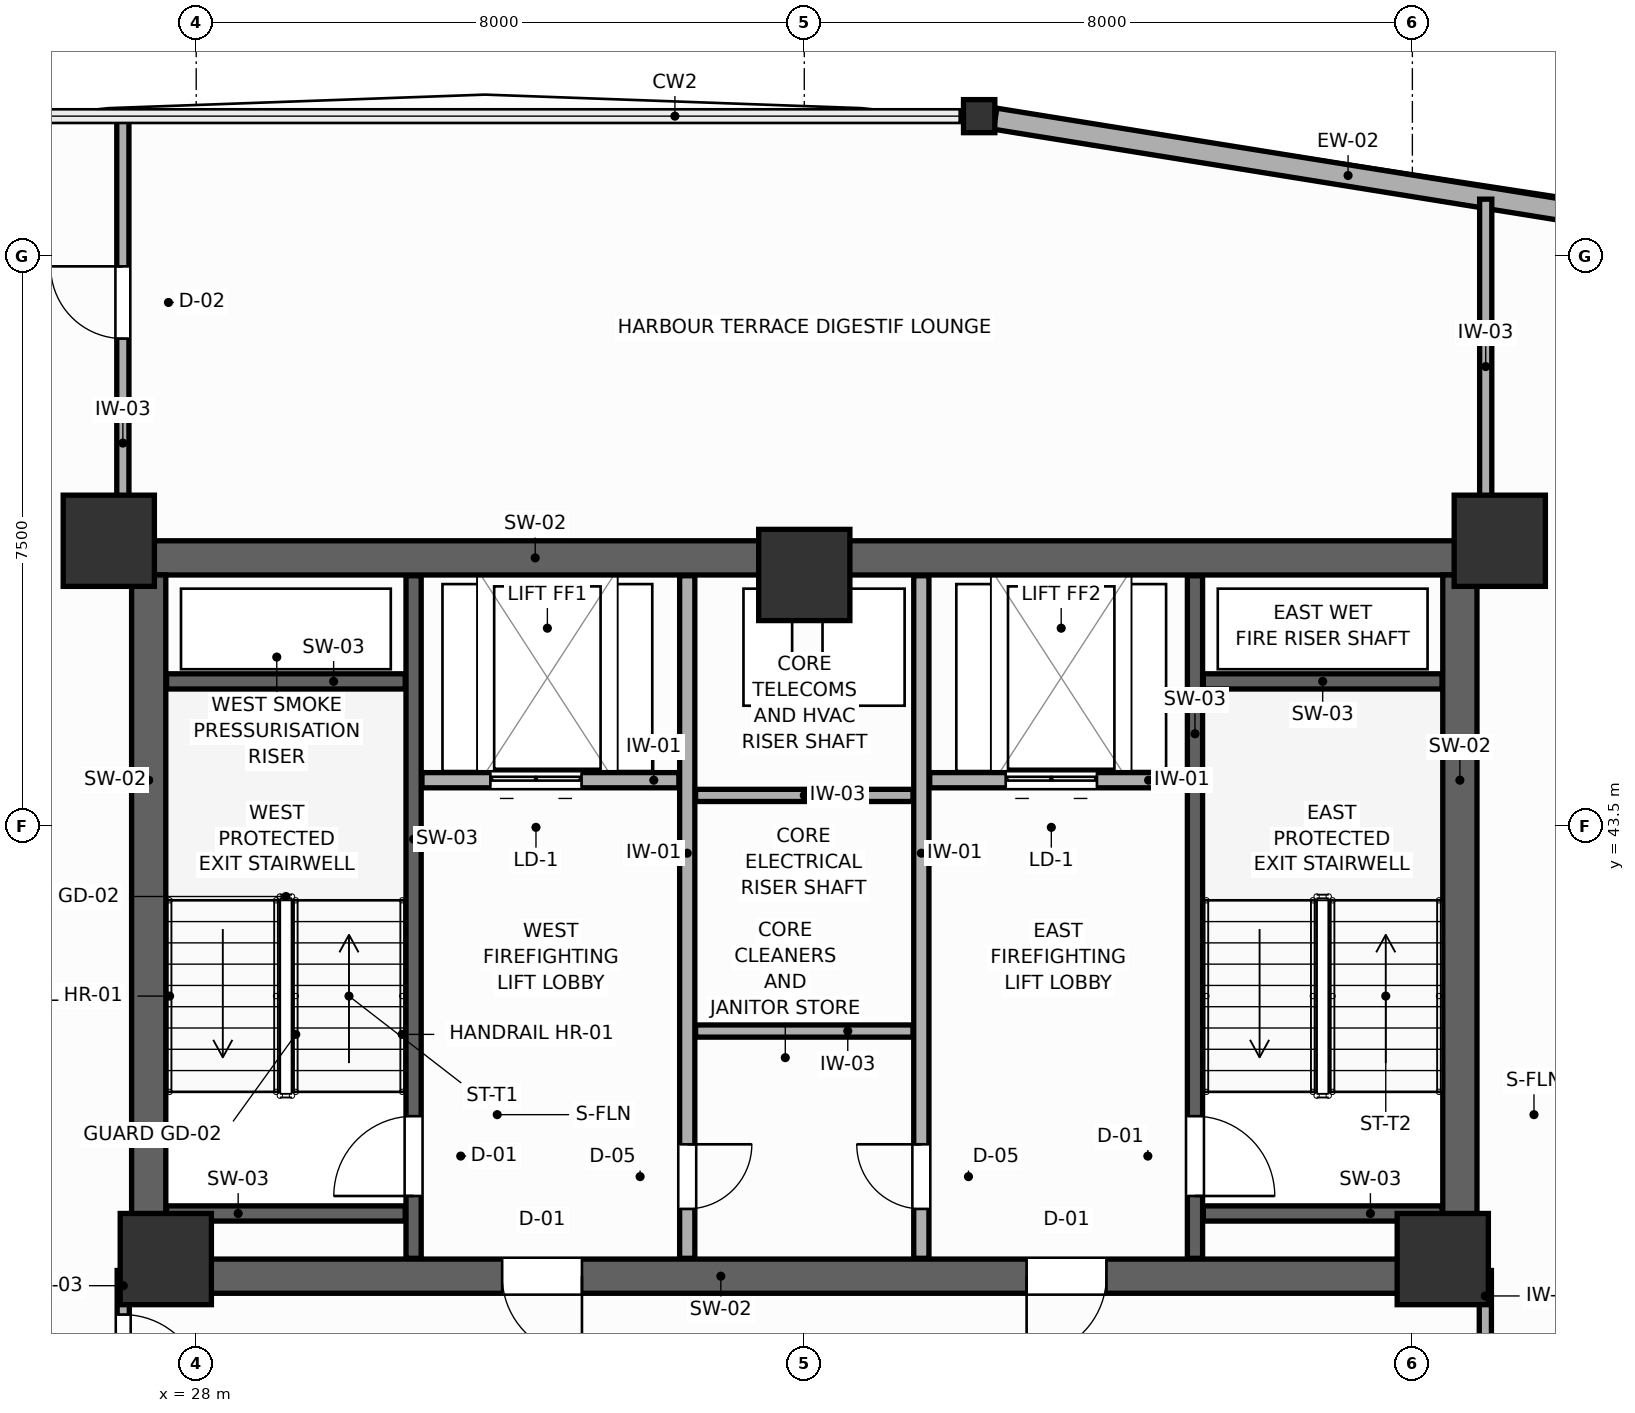
"""IFC4 building model, lengths in metres.
Left out: names, types, materials, properties, quantities, classifications, styles, units other than length and angle.
Written with IfcOpenShell. Run it as: python <this file> out.ifc"""

import sys

from ifc_helpers import new_model, si_unit, direction, frame, frame_2d, origin, origin_2d, place, context, subcontext, project, spatial, rectangle, i_section, extrude, source, transform, mapped, element, fill, save


model = new_model("IFC4")
c1 = context("Model", 3, precision=1e-05, world=origin(), true_north=direction((0.0, 1.0)))
c2 = subcontext(c1, "Body", "Model", "MODEL_VIEW")
j1 = project(units=[si_unit("LENGTHUNIT", "METRE"), si_unit("PLANEANGLEUNIT", "RADIAN")], contexts=[c1])
p1 = place(None, origin())
s1 = spatial("IfcSite", under=j1, at=p1, CompositionType="ELEMENT")
p2 = place(p1, origin())
s2 = spatial("IfcBuilding", under=s1, at=p2, CompositionType="ELEMENT")
p3 = place(p2, frame((0.0, 0.0, 150.6)))
s3 = spatial("IfcBuildingStorey", under=s2, at=p3, CompositionType="ELEMENT", Elevation=150.6)
p4 = place(p3, frame((27.15, 47.025, 0.0), z_axis=(0.0, 0.0, 1.0), x_axis=(1.0, 0.0, 0.0)))
e1 = element("IfcWall", 1, at=p4, inside=s3, PredefinedType="SHEAR", context=c2, shape_type="SweptSolid", body=[
    extrude(rectangle(XDim=17.7, YDim=0.45, at=frame_2d((8.85, 0.0))), origin(), (0.0, 0.0, 1.0), 3.6),
])
p5 = place(p3, frame((27.15, 37.575, 0.0), z_axis=(0.0, 0.0, 1.0), x_axis=(1.0, 0.0, 0.0)))
e2 = element("IfcWall", 2, at=p5, inside=s3, PredefinedType="SHEAR", context=c2, shape_type="SweptSolid", body=[
    extrude(rectangle(XDim=17.7, YDim=0.45, at=frame_2d((8.85, 0.0))), origin(), (0.0, 0.0, 1.0), 3.6),
])
p6 = place(p5, frame((4.875, 0.0, 0.0)))
e3 = element("IfcOpeningElement", 3, at=p6, cuts=e2, PredefinedType="OPENING", context=c2, shape_type="SweptSolid", body=[
    extrude(rectangle(XDim=1.05, YDim=2.1, at=frame_2d((0.525, 1.05))), frame((0.0, 0.235, 0.0), z_axis=(0.0, -1.0, 0.0), x_axis=(1.0, 0.0, 0.0)), (0.0, 0.0, 1.0), 0.47),
])
p7 = place(p5, frame((11.775, 0.0, 0.0)))
e4 = element("IfcOpeningElement", 4, at=p7, cuts=e2, PredefinedType="OPENING", context=c2, shape_type="SweptSolid", body=[
    extrude(rectangle(XDim=1.05, YDim=2.1, at=frame_2d((0.525, 1.05))), frame((0.0, 0.235, 0.0), z_axis=(0.0, -1.0, 0.0), x_axis=(1.0, 0.0, 0.0)), (0.0, 0.0, 1.0), 0.47),
])
for number, where, z_axis, x_axis in (
    (5, (27.375, 37.8, 0.0), (0.0, 0.0, 1.0), (0.0, 1.0, 0.0)),
    (6, (44.625, 37.8, 0.0), (0.0, 0.0, 1.0), (0.0, 1.0, 0.0)),
):
    element("IfcWall", number, at=place(p3, frame(where, z_axis=z_axis, x_axis=x_axis)), inside=s3, PredefinedType="SHEAR", context=c2, shape_type="SweptSolid", body=[
        extrude(rectangle(XDim=9.0, YDim=0.45, at=frame_2d((4.5, 0.0))), origin(), (0.0, 0.0, 1.0), 3.6),
    ])
m1 = source(origin(), c2, "Body", "SweptSolid", [
    extrude(rectangle(XDim=1.2, YDim=1.2, at=origin_2d()), origin(), (0.0, 0.0, 1.0), 3.6),
])
for number, where, z_axis, x_axis in (
    (7, (26.85, 47.25, 0.0), (0.0, 0.0, 1.0), (1.0, 0.0, 0.0)),
    (8, (45.15, 47.25, 0.0), (0.0, 0.0, 1.0), (1.0, 0.0, 0.0)),
    (9, (27.6, 37.8, 0.0), (0.0, 0.0, 1.0), (1.0, 0.0, 0.0)),
    (10, (44.4, 37.8, 0.0), (0.0, 0.0, 1.0), (1.0, 0.0, 0.0)),
    (11, (36.0, 46.8, 0.0), (0.0, 0.0, 1.0), (1.0, 0.0, 0.0)),
):
    element("IfcColumn", number, at=place(p3, frame(where, z_axis=z_axis, x_axis=x_axis)), inside=s3, PredefinedType="COLUMN", context=c2, shape_type="MappedRepresentation", body=[
        mapped(m1, transform((0.0, 0.0, 0.0), scale=1.0)),
    ])
m2 = source(origin(), c2, "Body", "SweptSolid", [
    extrude(i_section(OverallWidth=0.412, OverallDepth=0.435, WebThickness=0.033, FlangeThickness=0.053, FilletRadius=0.015, at=origin_2d()), origin(), (0.0, 0.0, 1.0), 3.6),
])
p8 = place(p3, frame((38.301, 52.836, 0.0), z_axis=(0.0, 0.0, 1.0), x_axis=(1.0, 0.0, 0.0)))
e12 = element("IfcColumn", 12, at=p8, inside=s3, PredefinedType="COLUMN", context=c2, shape_type="MappedRepresentation", body=[
    mapped(m2, transform((0.0, 0.0, 0.0), scale=1.0)),
])
p9 = place(p3, frame((53.07, 50.46, 0.0), z_axis=(0.0, 0.0, 1.0), x_axis=(-0.987303259595, 0.158846698404, 0.0)))
e13 = element("IfcWall", 13, at=p9, inside=s3, PredefinedType="SOLIDWALL", context=c2, shape_type="SweptSolid", body=[
    extrude(rectangle(XDim=14.746, YDim=0.28, at=frame_2d((7.373, 0.0))), origin(), (0.0, 0.0, 1.0), 3.0),
])
p10 = place(p9, frame((3.461, 0.0, 0.75)))
e14 = element("IfcOpeningElement", 14, at=p10, cuts=e13, PredefinedType="OPENING", context=c2, shape_type="SweptSolid", body=[
    extrude(rectangle(XDim=1.7, YDim=1.75, at=frame_2d((0.85, 0.875))), frame((0.0, 0.15, 0.0), z_axis=(0.0, -1.0, 0.0), x_axis=(1.0, 0.0, 0.0)), (0.0, 0.0, 1.0), 0.3),
])
p11 = place(p3, frame((30.86, 37.81, 0.0), z_axis=(0.0, 0.0, 1.0), x_axis=(0.0, 1.0, 0.0)))
e15 = element("IfcWall", 15, at=p11, inside=s3, PredefinedType="SHEAR", context=c2, shape_type="SweptSolid", body=[
    extrude(rectangle(XDim=8.98, YDim=0.2, at=frame_2d((4.49, 0.0))), origin(), (0.0, 0.0, 1.0), 3.6),
])
p12 = place(p11, frame((0.82, 0.0, 0.0)))
e16 = element("IfcOpeningElement", 16, at=p12, cuts=e15, PredefinedType="OPENING", context=c2, shape_type="SweptSolid", body=[
    extrude(rectangle(XDim=1.05, YDim=2.1, at=frame_2d((0.525, 1.05))), frame((0.0, 0.11, 0.0), z_axis=(0.0, -1.0, 0.0), x_axis=(1.0, 0.0, 0.0)), (0.0, 0.0, 1.0), 0.22),
])
for number, where, z_axis, x_axis in (
    (17, (27.61, 45.4, 0.0), (0.0, 0.0, 1.0), (1.0, 0.0, 0.0)),
    (18, (27.61, 38.4, 0.0), (0.0, 0.0, 1.0), (1.0, 0.0, 0.0)),
):
    element("IfcWall", number, at=place(p3, frame(where, z_axis=z_axis, x_axis=x_axis)), inside=s3, PredefinedType="SHEAR", context=c2, shape_type="SweptSolid", body=[
        extrude(rectangle(XDim=3.14, YDim=0.2, at=frame_2d((1.57, 0.0))), origin(), (0.0, 0.0, 1.0), 3.6),
    ])
p13 = place(p3, frame((41.14, 37.81, 0.0), z_axis=(0.0, 0.0, 1.0), x_axis=(0.0, 1.0, 0.0)))
e19 = element("IfcWall", 19, at=p13, inside=s3, PredefinedType="SHEAR", context=c2, shape_type="SweptSolid", body=[
    extrude(rectangle(XDim=8.98, YDim=0.2, at=frame_2d((4.49, 0.0))), origin(), (0.0, 0.0, 1.0), 3.6),
])
p14 = place(p13, frame((0.82, 0.0, 0.0)))
e20 = element("IfcOpeningElement", 20, at=p14, cuts=e19, PredefinedType="OPENING", context=c2, shape_type="SweptSolid", body=[
    extrude(rectangle(XDim=1.05, YDim=2.1, at=frame_2d((0.525, 1.05))), frame((0.0, 0.11, 0.0), z_axis=(0.0, -1.0, 0.0), x_axis=(1.0, 0.0, 0.0)), (0.0, 0.0, 1.0), 0.22),
])
for number, where, z_axis, x_axis in (
    (21, (41.25, 45.4, 0.0), (0.0, 0.0, 1.0), (1.0, 0.0, 0.0)),
    (22, (41.25, 38.4, 0.0), (0.0, 0.0, 1.0), (1.0, 0.0, 0.0)),
):
    element("IfcWall", number, at=place(p3, frame(where, z_axis=z_axis, x_axis=x_axis)), inside=s3, PredefinedType="SHEAR", context=c2, shape_type="SweptSolid", body=[
        extrude(rectangle(XDim=3.14, YDim=0.2, at=frame_2d((1.57, 0.0))), origin(), (0.0, 0.0, 1.0), 3.6),
    ])
p15 = place(p3, frame((30.97, 44.1, 0.0), z_axis=(0.0, 0.0, 1.0), x_axis=(1.0, 0.0, 0.0)))
e23 = element("IfcWall", 23, at=p15, inside=s3, PredefinedType="PARTITIONING", context=c2, shape_type="SweptSolid", body=[
    extrude(rectangle(XDim=3.38, YDim=0.2, at=frame_2d((1.69, 0.0))), origin(), (0.0, 0.0, 1.0), 3.4),
])
p16 = place(p15, frame((0.9, 0.0, 0.0)))
e24 = element("IfcOpeningElement", 24, at=p16, cuts=e23, PredefinedType="OPENING", context=c2, shape_type="SweptSolid", body=[
    extrude(rectangle(XDim=1.2, YDim=2.1, at=frame_2d((0.6, 1.05))), frame((0.0, 0.11, 0.0), z_axis=(0.0, -1.0, 0.0), x_axis=(1.0, 0.0, 0.0)), (0.0, 0.0, 1.0), 0.22),
])
p17 = place(p3, frame((37.65, 44.1, 0.0), z_axis=(0.0, 0.0, 1.0), x_axis=(1.0, 0.0, 0.0)))
e25 = element("IfcWall", 25, at=p17, inside=s3, PredefinedType="PARTITIONING", context=c2, shape_type="SweptSolid", body=[
    extrude(rectangle(XDim=3.38, YDim=0.2, at=frame_2d((1.69, 0.0))), origin(), (0.0, 0.0, 1.0), 3.4),
])
p18 = place(p17, frame((1.0, 0.0, 0.0)))
e26 = element("IfcOpeningElement", 26, at=p18, cuts=e25, PredefinedType="OPENING", context=c2, shape_type="SweptSolid", body=[
    extrude(rectangle(XDim=1.2, YDim=2.1, at=frame_2d((0.6, 1.05))), frame((0.0, 0.11, 0.0), z_axis=(0.0, -1.0, 0.0), x_axis=(1.0, 0.0, 0.0)), (0.0, 0.0, 1.0), 0.22),
])
p19 = place(p3, frame((34.46, 37.81, 0.0), z_axis=(0.0, 0.0, 1.0), x_axis=(0.0, 1.0, 0.0)))
e27 = element("IfcWall", 27, at=p19, inside=s3, PredefinedType="PARTITIONING", context=c2, shape_type="SweptSolid", body=[
    extrude(rectangle(XDim=8.98, YDim=0.2, at=frame_2d((4.49, 0.0))), origin(), (0.0, 0.0, 1.0), 3.4),
])
p20 = place(p19, frame((0.65, 0.0, 0.0)))
e28 = element("IfcOpeningElement", 28, at=p20, cuts=e27, PredefinedType="OPENING", context=c2, shape_type="SweptSolid", body=[
    extrude(rectangle(XDim=0.85, YDim=2.05, at=frame_2d((0.425, 1.025))), frame((0.0, 0.11, 0.0), z_axis=(0.0, -1.0, 0.0), x_axis=(1.0, 0.0, 0.0)), (0.0, 0.0, 1.0), 0.22),
])
p21 = place(p3, frame((37.54, 37.81, 0.0), z_axis=(0.0, 0.0, 1.0), x_axis=(0.0, 1.0, 0.0)))
e29 = element("IfcWall", 29, at=p21, inside=s3, PredefinedType="PARTITIONING", context=c2, shape_type="SweptSolid", body=[
    extrude(rectangle(XDim=8.98, YDim=0.2, at=frame_2d((4.49, 0.0))), origin(), (0.0, 0.0, 1.0), 3.4),
])
p22 = place(p21, frame((0.65, 0.0, 0.0)))
e30 = element("IfcOpeningElement", 30, at=p22, cuts=e29, PredefinedType="OPENING", context=c2, shape_type="SweptSolid", body=[
    extrude(rectangle(XDim=0.85, YDim=2.05, at=frame_2d((0.425, 1.025))), frame((0.0, 0.11, 0.0), z_axis=(0.0, -1.0, 0.0), x_axis=(1.0, 0.0, 0.0)), (0.0, 0.0, 1.0), 0.22),
])
for number, where, z_axis, x_axis in (
    (31, (34.57, 40.8, 0.0), (0.0, 0.0, 1.0), (1.0, 0.0, 0.0)),
    (32, (34.57, 43.9, 0.0), (0.0, 0.0, 1.0), (1.0, 0.0, 0.0)),
):
    element("IfcWall", number, at=place(p3, frame(where, z_axis=z_axis, x_axis=x_axis)), inside=s3, PredefinedType="PARTITIONING", context=c2, shape_type="SweptSolid", body=[
        extrude(rectangle(XDim=2.86, YDim=0.16, at=frame_2d((1.43, 0.0))), origin(), (0.0, 0.0, 1.0), 3.4),
    ])
p23 = place(p3, frame((27.04, 35.54, 0.0), z_axis=(0.0, 0.0, 1.0), x_axis=(0.0, 1.0, 0.0)))
e33 = element("IfcWall", 33, at=p23, inside=s3, PredefinedType="PARTITIONING", context=c2, shape_type="SweptSolid", body=[
    extrude(rectangle(XDim=2.11, YDim=0.16, at=frame_2d((1.055, 0.0))), origin(), (0.0, 0.0, 1.0), 3.4),
])
p24 = place(p23, frame((0.48, 0.0, 0.0)))
e34 = element("IfcOpeningElement", 34, at=p24, cuts=e33, PredefinedType="OPENING", context=c2, shape_type="SweptSolid", body=[
    extrude(rectangle(XDim=1.05, YDim=2.1, at=frame_2d((0.525, 1.05))), frame((0.0, 0.09, 0.0), z_axis=(0.0, -1.0, 0.0), x_axis=(1.0, 0.0, 0.0)), (0.0, 0.0, 1.0), 0.18),
])
p25 = place(p3, frame((44.96, 35.0, 0.0), z_axis=(0.0, 0.0, 1.0), x_axis=(0.0, 1.0, 0.0)))
e35 = element("IfcWall", 35, at=p25, inside=s3, PredefinedType="PARTITIONING", context=c2, shape_type="SweptSolid", body=[
    extrude(rectangle(XDim=2.65, YDim=0.16, at=frame_2d((1.325, 0.0))), origin(), (0.0, 0.0, 1.0), 3.4),
])
p26 = place(p25, frame((0.75, 0.0, 0.0)))
e36 = element("IfcOpeningElement", 36, at=p26, cuts=e35, PredefinedType="OPENING", context=c2, shape_type="SweptSolid", body=[
    extrude(rectangle(XDim=1.05, YDim=2.1, at=frame_2d((0.525, 1.05))), frame((0.0, 0.09, 0.0), z_axis=(0.0, -1.0, 0.0), x_axis=(1.0, 0.0, 0.0)), (0.0, 0.0, 1.0), 0.18),
])
p27 = place(p3, frame((27.035, 47.34, 0.0), z_axis=(0.0, 0.0, 1.0), x_axis=(0.0, 1.0, 0.0)))
e37 = element("IfcWall", 37, at=p27, inside=s3, PredefinedType="PARTITIONING", context=c2, shape_type="SweptSolid", body=[
    extrude(rectangle(XDim=5.476, YDim=0.16, at=frame_2d((2.738, 0.0))), origin(), (0.0, 0.0, 1.0), 3.4),
])
p28 = place(p27, frame((2.57, 0.0, 0.0)))
e38 = element("IfcOpeningElement", 38, at=p28, cuts=e37, PredefinedType="OPENING", context=c2, shape_type="SweptSolid", body=[
    extrude(rectangle(XDim=0.95, YDim=2.05, at=frame_2d((0.475, 1.025))), frame((0.0, 0.09, 0.0), z_axis=(0.0, -1.0, 0.0), x_axis=(1.0, 0.0, 0.0)), (0.0, 0.0, 1.0), 0.18),
])
p29 = place(p3, frame((44.965, 47.34, 0.0), z_axis=(0.0, 0.0, 1.0), x_axis=(0.0, 1.0, 0.0)))
e39 = element("IfcWall", 39, at=p29, inside=s3, PredefinedType="PARTITIONING", context=c2, shape_type="SweptSolid", body=[
    extrude(rectangle(XDim=4.404, YDim=0.16, at=frame_2d((2.202, 0.0))), origin(), (0.0, 0.0, 1.0), 3.4),
])
p30 = place(p12, origin())
e40 = element("IfcDoor", 40, at=p30, inside=s3, OperationType="SINGLE_SWING_LEFT", PredefinedType="DOOR", context=c2, shape_type="SweptSolid", body=[
    extrude(rectangle(XDim=1.05, YDim=2.1, at=frame_2d((0.525, 1.05))), frame((0.0, 0.025, 0.0), z_axis=(0.0, -1.0, 0.0), x_axis=(1.0, 0.0, 0.0)), (0.0, 0.0, 1.0), 0.05),
])
fill(e16, e40)
p31 = place(p14, frame((1.05, 0.0, 0.0), z_axis=(0.0, 0.0, 1.0), x_axis=(-1.0, 0.0, 0.0)))
e41 = element("IfcDoor", 41, at=p31, inside=s3, OperationType="SINGLE_SWING_RIGHT", PredefinedType="DOOR", context=c2, shape_type="SweptSolid", body=[
    extrude(rectangle(XDim=1.05, YDim=2.1, at=frame_2d((0.525, 1.05))), frame((0.0, 0.025, 0.0), z_axis=(0.0, -1.0, 0.0), x_axis=(1.0, 0.0, 0.0)), (0.0, 0.0, 1.0), 0.05),
])
fill(e20, e41)
p32 = place(p16, origin())
e42 = element("IfcDoor", 42, at=p32, inside=s3, OperationType="DOUBLE_DOOR_SLIDING", PredefinedType="DOOR", context=c2, shape_type="SweptSolid", body=[
    extrude(rectangle(XDim=1.2, YDim=2.1, at=frame_2d((0.6, 1.05))), frame((0.0, 0.025, 0.0), z_axis=(0.0, -1.0, 0.0), x_axis=(1.0, 0.0, 0.0)), (0.0, 0.0, 1.0), 0.05),
])
fill(e24, e42)
p33 = place(p18, origin())
e43 = element("IfcDoor", 43, at=p33, inside=s3, OperationType="DOUBLE_DOOR_SLIDING", PredefinedType="DOOR", context=c2, shape_type="SweptSolid", body=[
    extrude(rectangle(XDim=1.2, YDim=2.1, at=frame_2d((0.6, 1.05))), frame((0.0, 0.025, 0.0), z_axis=(0.0, -1.0, 0.0), x_axis=(1.0, 0.0, 0.0)), (0.0, 0.0, 1.0), 0.05),
])
fill(e26, e43)
p34 = place(p20, frame((0.85, 0.0, 0.0), z_axis=(0.0, 0.0, 1.0), x_axis=(-1.0, 0.0, 0.0)))
e44 = element("IfcDoor", 44, at=p34, inside=s3, OperationType="SINGLE_SWING_LEFT", PredefinedType="DOOR", context=c2, shape_type="SweptSolid", body=[
    extrude(rectangle(XDim=0.85, YDim=2.05, at=frame_2d((0.425, 1.025))), frame((0.0, 0.025, 0.0), z_axis=(0.0, -1.0, 0.0), x_axis=(1.0, 0.0, 0.0)), (0.0, 0.0, 1.0), 0.05),
])
fill(e28, e44)
p35 = place(p22, origin())
e45 = element("IfcDoor", 45, at=p35, inside=s3, OperationType="SINGLE_SWING_RIGHT", PredefinedType="DOOR", context=c2, shape_type="SweptSolid", body=[
    extrude(rectangle(XDim=0.85, YDim=2.05, at=frame_2d((0.425, 1.025))), frame((0.0, 0.025, 0.0), z_axis=(0.0, -1.0, 0.0), x_axis=(1.0, 0.0, 0.0)), (0.0, 0.0, 1.0), 0.05),
])
fill(e30, e45)
p36 = place(p24, frame((1.05, 0.0, 0.0), z_axis=(0.0, 0.0, 1.0), x_axis=(-1.0, 0.0, 0.0)))
e46 = element("IfcDoor", 46, at=p36, inside=s3, OperationType="SINGLE_SWING_RIGHT", PredefinedType="DOOR", context=c2, shape_type="SweptSolid", body=[
    extrude(rectangle(XDim=1.05, YDim=2.1, at=frame_2d((0.525, 1.05))), frame((0.0, 0.025, 0.0), z_axis=(0.0, -1.0, 0.0), x_axis=(1.0, 0.0, 0.0)), (0.0, 0.0, 1.0), 0.05),
])
fill(e34, e46)
p37 = place(p28, origin())
e47 = element("IfcDoor", 47, at=p37, inside=s3, OperationType="SINGLE_SWING_RIGHT", PredefinedType="DOOR", context=c2, shape_type="SweptSolid", body=[
    extrude(rectangle(XDim=0.95, YDim=2.05, at=frame_2d((0.475, 1.025))), frame((0.0, 0.025, 0.0), z_axis=(0.0, -1.0, 0.0), x_axis=(1.0, 0.0, 0.0)), (0.0, 0.0, 1.0), 0.05),
])
fill(e38, e47)
p38 = place(p6, frame((1.05, 0.0, 0.0), z_axis=(0.0, 0.0, 1.0), x_axis=(-1.0, 0.0, 0.0)))
e48 = element("IfcDoor", 48, at=p38, inside=s3, OperationType="SINGLE_SWING_LEFT", PredefinedType="DOOR", context=c2, shape_type="SweptSolid", body=[
    extrude(rectangle(XDim=1.05, YDim=2.1, at=frame_2d((0.525, 1.05))), frame((0.0, 0.025, 0.0), z_axis=(0.0, -1.0, 0.0), x_axis=(1.0, 0.0, 0.0)), (0.0, 0.0, 1.0), 0.05),
])
fill(e3, e48)
p39 = place(p7, frame((1.05, 0.0, 0.0), z_axis=(0.0, 0.0, 1.0), x_axis=(-1.0, 0.0, 0.0)))
e49 = element("IfcDoor", 49, at=p39, inside=s3, OperationType="SINGLE_SWING_RIGHT", PredefinedType="DOOR", context=c2, shape_type="SweptSolid", body=[
    extrude(rectangle(XDim=1.05, YDim=2.1, at=frame_2d((0.525, 1.05))), frame((0.0, 0.025, 0.0), z_axis=(0.0, -1.0, 0.0), x_axis=(1.0, 0.0, 0.0)), (0.0, 0.0, 1.0), 0.05),
])
fill(e4, e49)
save(model, sys.argv[1])
